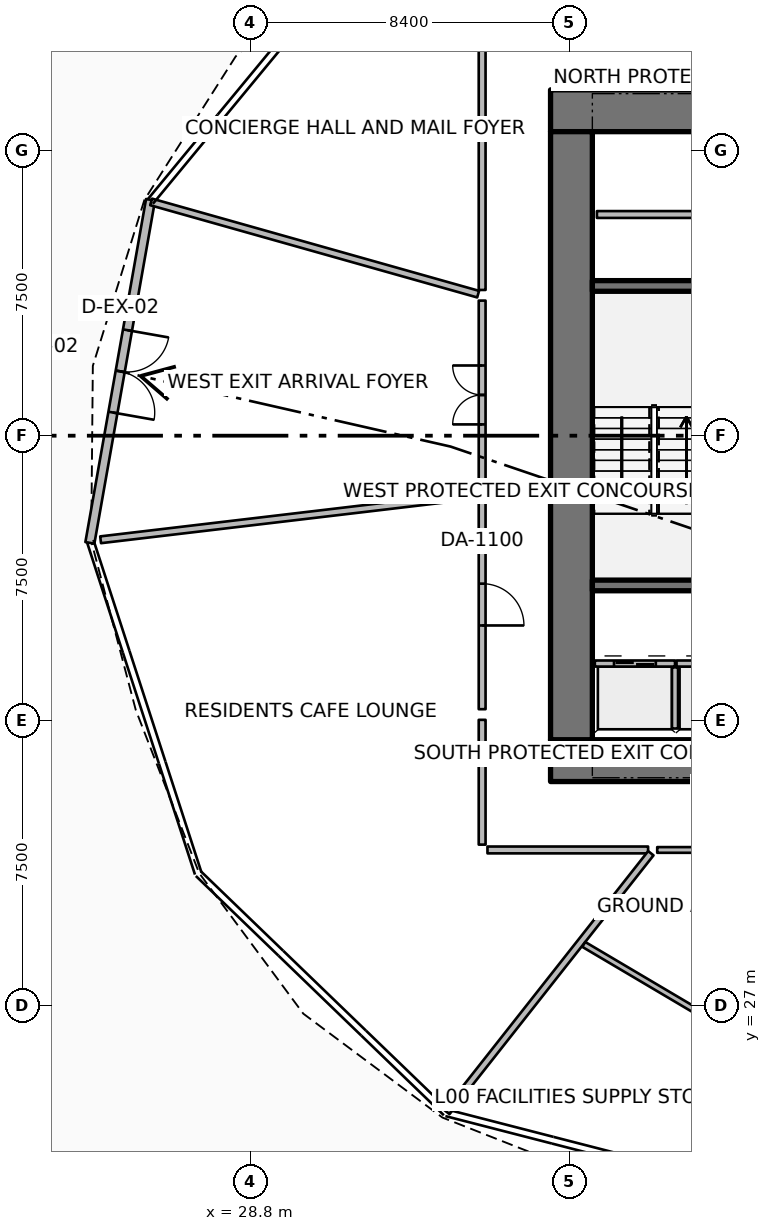
"""IFC4 building model, lengths in metres.
Left out: names, types, materials, properties, quantities, classifications, styles, units other than length and angle.
Written with IfcOpenShell. Run it as: python <this file> out.ifc"""

import sys

from ifc_helpers import new_model, si_unit, direction, frame, frame_2d, origin, place, context, subcontext, project, spatial, rectangle, extrude, element, fill, save


model = new_model("IFC4")
c1 = context("Model", 3, precision=1e-05, world=origin(), true_north=direction((0.0, 1.0)))
c2 = subcontext(c1, "Body", "Model", "MODEL_VIEW")
j1 = project(units=[si_unit("LENGTHUNIT", "METRE"), si_unit("PLANEANGLEUNIT", "RADIAN")], contexts=[c1])
p1 = place(None, origin())
s1 = spatial("IfcSite", under=j1, at=p1, CompositionType="ELEMENT")
p2 = place(p1, origin())
s2 = spatial("IfcBuilding", under=s1, at=p2, CompositionType="ELEMENT")
p3 = place(p2, origin())
s3 = spatial("IfcBuildingStorey", under=s2, at=p3, CompositionType="ELEMENT", Elevation=0.0)
for number, where, z_axis, x_axis in (
    (1, (36.7, 33.45, 0.0), (0.0, 0.0, 1.0), (1.0, 0.0, 0.0)),
    (2, (36.7, 50.55, 0.0), (0.0, 0.0, 1.0), (1.0, 0.0, 0.0)),
):
    element("IfcWall", number, at=place(p3, frame(where, z_axis=z_axis, x_axis=x_axis)), inside=s3, PredefinedType="SHEAR", context=c2, shape_type="SweptSolid", body=[
        extrude(rectangle(XDim=10.2, YDim=1.1, at=frame_2d((5.1, 0.0))), origin(), (0.0, 0.0, 1.0), 7.2),
    ])
p4 = place(p3, frame((37.25, 34.0, 0.0), z_axis=(0.0, 0.0, 1.0), x_axis=(0.0, 1.0, 0.0)))
e3 = element("IfcWall", 3, at=p4, inside=s3, PredefinedType="SHEAR", context=c2, shape_type="SweptSolid", body=[
    extrude(rectangle(XDim=16.0, YDim=1.1, at=frame_2d((8.0, 0.0))), origin(), (0.0, 0.0, 1.0), 7.2),
])
for number, where, z_axis, x_axis in (
    (4, (37.8, 38.06, 0.0), (0.0, 0.0, 1.0), (1.0, 0.0, 0.0)),
    (5, (37.8, 45.94, 0.0), (0.0, 0.0, 1.0), (1.0, 0.0, 0.0)),
):
    element("IfcWall", number, at=place(p3, frame(where, z_axis=z_axis, x_axis=x_axis)), inside=s3, PredefinedType="SHEAR", context=c2, shape_type="SweptSolid", body=[
        extrude(rectangle(XDim=3.5, YDim=0.28, at=frame_2d((1.75, 0.0))), origin(), (0.0, 0.0, 1.0), 7.2),
    ])
p5 = place(p3, frame((24.578, 39.18, 0.0), z_axis=(0.0, 0.0, 1.0), x_axis=(0.174163599579, 0.984716731137, 0.0)))
e6 = element("IfcWall", 6, at=p5, inside=s3, PredefinedType="SOLIDWALL", context=c2, shape_type="SweptSolid", body=[
    extrude(rectangle(XDim=9.168, YDim=0.24, at=frame_2d((4.584, 0.0))), origin(), (0.0, 0.0, 1.0), 5.35),
])
p6 = place(p5, frame((3.484, 0.0, 0.0)))
e7 = element("IfcOpeningElement", 7, at=p6, cuts=e6, PredefinedType="OPENING", context=c2, shape_type="SweptSolid", body=[
    extrude(rectangle(XDim=2.2, YDim=2.4, at=frame_2d((1.1, 1.2))), frame((0.0, 0.13, 0.0), z_axis=(0.0, -1.0, 0.0), x_axis=(1.0, 0.0, 0.0)), (0.0, 0.0, 1.0), 0.26),
])
p7 = place(p3, frame((37.865, 36.005, 0.0), z_axis=(0.0, 0.0, 1.0), x_axis=(1.0, 0.0, 0.0)))
e8 = element("IfcWall", 8, at=p7, inside=s3, PredefinedType="PARTITIONING", context=c2, shape_type="SweptSolid", body=[
    extrude(rectangle(XDim=2.11, YDim=0.16, at=frame_2d((1.055, 0.0))), origin(), (0.0, 0.0, 1.0), 6.8),
])
p8 = place(p7, frame((0.505, 0.0, 0.0)))
e9 = element("IfcOpeningElement", 9, at=p8, cuts=e8, PredefinedType="OPENING", context=c2, shape_type="SweptSolid", body=[
    extrude(rectangle(XDim=1.1, YDim=2.1, at=frame_2d((0.55, 1.05))), frame((0.0, 0.09, 0.0), z_axis=(0.0, -1.0, 0.0), x_axis=(1.0, 0.0, 0.0)), (0.0, 0.0, 1.0), 0.18),
])
p9 = place(p3, frame((39.975, 34.295, 0.0), z_axis=(0.0, 0.0, 1.0), x_axis=(0.0, 1.0, 0.0)))
e10 = element("IfcWall", 10, at=p9, inside=s3, PredefinedType="PARTITIONING", context=c2, shape_type="SweptSolid", body=[
    extrude(rectangle(XDim=1.61, YDim=0.16, at=frame_2d((0.805, 0.0))), origin(), (0.0, 0.0, 1.0), 6.8),
])
p10 = place(p3, frame((40.015, 36.005, 0.0), z_axis=(0.0, 0.0, 1.0), x_axis=(1.0, 0.0, 0.0)))
e11 = element("IfcWall", 11, at=p10, inside=s3, PredefinedType="PARTITIONING", context=c2, shape_type="SweptSolid", body=[
    extrude(rectangle(XDim=2.11, YDim=0.16, at=frame_2d((1.055, 0.0))), origin(), (0.0, 0.0, 1.0), 6.8),
])
p11 = place(p10, frame((0.505, 0.0, 0.0)))
e12 = element("IfcOpeningElement", 12, at=p11, cuts=e11, PredefinedType="OPENING", context=c2, shape_type="SweptSolid", body=[
    extrude(rectangle(XDim=1.1, YDim=2.1, at=frame_2d((0.55, 1.05))), frame((0.0, 0.09, 0.0), z_axis=(0.0, -1.0, 0.0), x_axis=(1.0, 0.0, 0.0)), (0.0, 0.0, 1.0), 0.18),
])
p12 = place(p3, frame((37.92, 47.82, 0.0), z_axis=(0.0, 0.0, 1.0), x_axis=(1.0, 0.0, 0.0)))
e13 = element("IfcWall", 13, at=p12, inside=s3, PredefinedType="PARTITIONING", context=c2, shape_type="SweptSolid", body=[
    extrude(rectangle(XDim=6.26, YDim=0.18, at=frame_2d((3.13, 0.0))), origin(), (0.0, 0.0, 1.0), 6.8),
])
p13 = place(p12, frame((2.705, 0.0, 0.0)))
e14 = element("IfcOpeningElement", 14, at=p13, cuts=e13, PredefinedType="OPENING", context=c2, shape_type="SweptSolid", body=[
    extrude(rectangle(XDim=0.85, YDim=2.06, at=frame_2d((0.425, 1.03))), frame((0.0, 0.1, 0.0), z_axis=(0.0, -1.0, 0.0), x_axis=(1.0, 0.0, 0.0)), (0.0, 0.0, 1.0), 0.2),
])
p14 = place(p3, frame((34.9, 52.187, 0.0), z_axis=(0.0, 0.0, 1.0), x_axis=(0.0, -1.0, 0.0)))
e15 = element("IfcWall", 15, at=p14, inside=s3, PredefinedType="PARTITIONING", context=c2, shape_type="SweptSolid", body=[
    extrude(rectangle(XDim=6.353, YDim=0.18, at=frame_2d((3.176, 0.0))), origin(), (0.0, 0.0, 1.0), 5.375),
])
p15 = place(p3, frame((34.794, 45.725, 0.0), z_axis=(0.0, 0.0, 1.0), x_axis=(-0.962463212271, 0.271412168159, 0.0)))
e16 = element("IfcWall", 16, at=p15, inside=s3, PredefinedType="PARTITIONING", context=c2, shape_type="SweptSolid", body=[
    extrude(rectangle(XDim=8.94, YDim=0.18, at=frame_2d((4.47, 0.0))), origin(), (0.0, 0.0, 1.0), 5.375),
])
p16 = place(p3, frame((34.9, 45.555, 0.0), z_axis=(0.0, 0.0, 1.0), x_axis=(0.0, -1.0, 0.0)))
e17 = element("IfcWall", 17, at=p16, inside=s3, PredefinedType="PARTITIONING", context=c2, shape_type="SweptSolid", body=[
    extrude(rectangle(XDim=4.965, YDim=0.18, at=frame_2d((2.482, 0.0))), origin(), (0.0, 0.0, 1.0), 5.375),
])
p17 = place(p16, frame((1.708, 0.0, 0.0)))
e18 = element("IfcOpeningElement", 18, at=p17, cuts=e17, PredefinedType="OPENING", context=c2, shape_type="SweptSolid", body=[
    extrude(rectangle(XDim=1.55, YDim=2.15, at=frame_2d((0.775, 1.075))), frame((0.0, 0.1, 0.0), z_axis=(0.0, -1.0, 0.0), x_axis=(1.0, 0.0, 0.0)), (0.0, 0.0, 1.0), 0.2),
])
p18 = place(p3, frame((34.791, 40.437, 0.0), z_axis=(0.0, 0.0, 1.0), x_axis=(-0.993069036869, -0.117532497689, 0.0)))
e19 = element("IfcWall", 19, at=p18, inside=s3, PredefinedType="PARTITIONING", context=c2, shape_type="SweptSolid", body=[
    extrude(rectangle(XDim=10.0, YDim=0.18, at=frame_2d((5.0, 0.0))), origin(), (0.0, 0.0, 1.0), 5.375),
])
p19 = place(p3, frame((34.9, 40.31, 0.0), z_axis=(0.0, 0.0, 1.0), x_axis=(0.0, -1.0, 0.0)))
e20 = element("IfcWall", 20, at=p19, inside=s3, PredefinedType="PARTITIONING", context=c2, shape_type="SweptSolid", body=[
    extrude(rectangle(XDim=5.506, YDim=0.18, at=frame_2d((2.753, 0.0))), origin(), (0.0, 0.0, 1.0), 5.375),
])
p20 = place(p19, frame((2.203, 0.0, 0.0)))
e21 = element("IfcOpeningElement", 21, at=p20, cuts=e20, PredefinedType="OPENING", context=c2, shape_type="SweptSolid", body=[
    extrude(rectangle(XDim=1.1, YDim=2.1, at=frame_2d((0.55, 1.05))), frame((0.0, 0.1, 0.0), z_axis=(0.0, -1.0, 0.0), x_axis=(1.0, 0.0, 0.0)), (0.0, 0.0, 1.0), 0.2),
])
p21 = place(p3, frame((34.9, 34.524, 0.0), z_axis=(0.0, 0.0, 1.0), x_axis=(0.0, -1.0, 0.0)))
e22 = element("IfcWall", 22, at=p21, inside=s3, PredefinedType="PARTITIONING", context=c2, shape_type="SweptSolid", body=[
    extrude(rectangle(XDim=3.284, YDim=0.18, at=frame_2d((1.642, 0.0))), origin(), (0.0, 0.0, 1.0), 5.375),
])
p22 = place(p3, frame((35.04, 31.1, 0.0), z_axis=(0.0, 0.0, 1.0), x_axis=(1.0, 0.0, 0.0)))
e23 = element("IfcWall", 23, at=p22, inside=s3, PredefinedType="PARTITIONING", context=c2, shape_type="SweptSolid", body=[
    extrude(rectangle(XDim=4.227, YDim=0.18, at=frame_2d((2.114, 0.0))), origin(), (0.0, 0.0, 1.0), 5.375),
])
p23 = place(p3, frame((39.339, 31.014, 0.0), z_axis=(0.0, 0.0, 1.0), x_axis=(-0.619079077481, -0.785328654657, 0.0)))
e24 = element("IfcWall", 24, at=p23, inside=s3, PredefinedType="PARTITIONING", context=c2, shape_type="SweptSolid", body=[
    extrude(rectangle(XDim=8.672, YDim=0.18, at=frame_2d((4.336, 0.0))), origin(), (0.0, 0.0, 1.0), 5.375),
])
p24 = place(p3, frame((39.507, 31.1, 0.0), z_axis=(0.0, 0.0, 1.0), x_axis=(1.0, 0.0, 0.0)))
e25 = element("IfcWall", 25, at=p24, inside=s3, PredefinedType="PARTITIONING", context=c2, shape_type="SweptSolid", body=[
    extrude(rectangle(XDim=3.797, YDim=0.15, at=frame_2d((1.899, 0.0))), origin(), (0.0, 0.0, 1.0), 5.375),
])
p25 = place(p24, frame((1.474, 0.0, 0.0)))
e26 = element("IfcOpeningElement", 26, at=p25, cuts=e25, PredefinedType="OPENING", context=c2, shape_type="SweptSolid", body=[
    extrude(rectangle(XDim=0.85, YDim=2.06, at=frame_2d((0.425, 1.03))), frame((0.0, 0.085, 0.0), z_axis=(0.0, -1.0, 0.0), x_axis=(1.0, 0.0, 0.0)), (0.0, 0.0, 1.0), 0.17),
])
p26 = place(p3, frame((37.574, 28.615, 0.0), z_axis=(0.0, 0.0, 1.0), x_axis=(0.860721546392, -0.509076044984, 0.0)))
e27 = element("IfcWall", 27, at=p26, inside=s3, PredefinedType="PARTITIONING", context=c2, shape_type="SweptSolid", body=[
    extrude(rectangle(XDim=4.341, YDim=0.15, at=frame_2d((2.17, 0.0))), origin(), (0.0, 0.0, 1.0), 5.375),
])
p27 = place(p6, origin())
e28 = element("IfcDoor", 28, at=p27, inside=s3, OperationType="DOUBLE_DOOR_SINGLE_SWING", PredefinedType="DOOR", context=c2, shape_type="SweptSolid", body=[
    extrude(rectangle(XDim=2.2, YDim=2.4, at=frame_2d((1.1, 1.2))), frame((0.0, 0.025, 0.0), z_axis=(0.0, -1.0, 0.0), x_axis=(1.0, 0.0, 0.0)), (0.0, 0.0, 1.0), 0.05),
])
fill(e7, e28)
p28 = place(p8, origin())
e29 = element("IfcDoor", 29, at=p28, inside=s3, OperationType="DOUBLE_DOOR_SLIDING", PredefinedType="DOOR", context=c2, shape_type="SweptSolid", body=[
    extrude(rectangle(XDim=1.1, YDim=2.1, at=frame_2d((0.55, 1.05))), frame((0.0, 0.025, 0.0), z_axis=(0.0, -1.0, 0.0), x_axis=(1.0, 0.0, 0.0)), (0.0, 0.0, 1.0), 0.05),
])
fill(e9, e29)
p29 = place(p17, origin())
e30 = element("IfcDoor", 30, at=p29, inside=s3, OperationType="DOUBLE_DOOR_SINGLE_SWING", PredefinedType="DOOR", context=c2, shape_type="SweptSolid", body=[
    extrude(rectangle(XDim=1.55, YDim=2.15, at=frame_2d((0.775, 1.075))), frame((0.0, 0.025, 0.0), z_axis=(0.0, -1.0, 0.0), x_axis=(1.0, 0.0, 0.0)), (0.0, 0.0, 1.0), 0.05),
])
fill(e18, e30)
p30 = place(p20, origin())
e31 = element("IfcDoor", 31, at=p30, inside=s3, OperationType="SINGLE_SWING_RIGHT", PredefinedType="DOOR", context=c2, shape_type="SweptSolid", body=[
    extrude(rectangle(XDim=1.1, YDim=2.1, at=frame_2d((0.55, 1.05))), frame((0.0, 0.025, 0.0), z_axis=(0.0, -1.0, 0.0), x_axis=(1.0, 0.0, 0.0)), (0.0, 0.0, 1.0), 0.05),
])
fill(e21, e31)
save(model, sys.argv[1])
